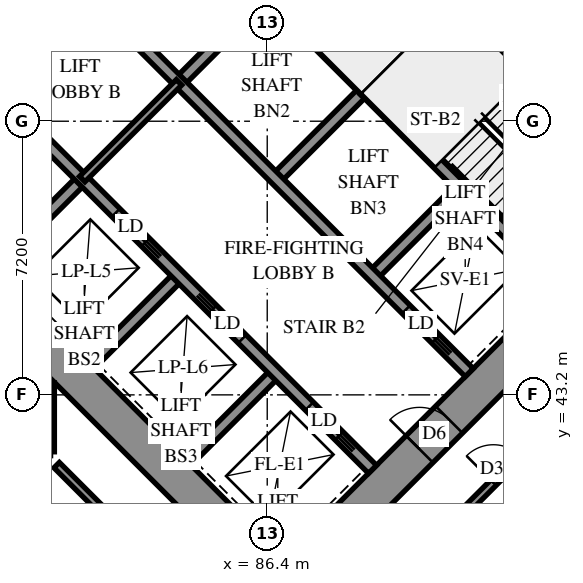
"""IFC4 building model, lengths in metres.
Left out: names, types, materials, properties, quantities, classifications, styles, units other than length and angle.
Written with IfcOpenShell. Run it as: python <this file> out.ifc"""

import sys

from ifc_helpers import new_model, si_unit, direction, frame, frame_2d, origin, place, context, subcontext, project, spatial, polyline, rectangle, outline, extrude, element, fill, save


model = new_model("IFC4")
c1 = context("Model", 3, precision=1e-05, world=origin(), true_north=direction((0.0, 1.0)))
c2 = subcontext(c1, "Body", "Model", "MODEL_VIEW")
j1 = project(units=[si_unit("LENGTHUNIT", "METRE"), si_unit("PLANEANGLEUNIT", "RADIAN")], contexts=[c1])
p1 = place(None, origin())
s1 = spatial("IfcSite", under=j1, at=p1, CompositionType="ELEMENT")
p2 = place(p1, origin())
s2 = spatial("IfcBuilding", under=s1, at=p2, CompositionType="ELEMENT")
p3 = place(p2, frame((0.0, 0.0, 18.6)))
s3 = spatial("IfcBuildingStorey", under=s2, at=p3, CompositionType="ELEMENT", Elevation=18.6)
p4 = place(p3, frame((75.594, 49.443, -0.4), z_axis=(0.0, 0.0, 1.0), x_axis=(0.7071037324, -0.70710983, 0.0)))
e1 = element("IfcWall", 1, at=p4, inside=s3, PredefinedType="SHEAR", context=c2, shape_type="SweptSolid", body=[
    extrude(rectangle(XDim=16.4, YDim=1.0, at=frame_2d((8.2, 0.0))), origin(), (0.0, 0.0, 1.0), 3.5),
])
p5 = place(p3, frame((86.483, 60.333, -0.4), z_axis=(0.0, 0.0, 1.0), x_axis=(0.70710983, -0.7071037324, 0.0)))
e2 = element("IfcWall", 2, at=p5, inside=s3, PredefinedType="SHEAR", context=c2, shape_type="SweptSolid", body=[
    extrude(rectangle(XDim=16.4, YDim=1.0, at=frame_2d((8.2, 0.0))), origin(), (0.0, 0.0, 1.0), 3.5),
])
p6 = place(p5, frame((11.0, 0.0, 0.4)))
e3 = element("IfcOpeningElement", 3, at=p6, cuts=e2, PredefinedType="OPENING", context=c2, shape_type="SweptSolid", body=[
    extrude(rectangle(XDim=0.8, YDim=2.1, at=frame_2d((0.4, 1.05))), frame((0.0, 0.51, 0.0), z_axis=(0.0, -1.0, 0.0), x_axis=(1.0, 0.0, 0.0)), (0.0, 0.0, 1.0), 1.02),
])
p7 = place(p3, frame((76.301, 49.443, -0.4), z_axis=(0.0, 0.0, 1.0), x_axis=(0.7071067812, 0.7071067812, 0.0)))
e4 = element("IfcWall", 4, at=p7, inside=s3, PredefinedType="SHEAR", context=c2, shape_type="SweptSolid", body=[
    extrude(rectangle(XDim=14.4, YDim=1.0, at=frame_2d((7.2, 0.0))), origin(), (0.0, 0.0, 1.0), 3.5),
])
p8 = place(p7, frame((4.55, 0.0, 0.4)))
e5 = element("IfcOpeningElement", 5, at=p8, cuts=e4, PredefinedType="OPENING", context=c2, shape_type="SweptSolid", body=[
    extrude(rectangle(XDim=1.1, YDim=2.1, at=frame_2d((0.55, 1.05))), frame((0.0, 0.51, 0.0), z_axis=(0.0, -1.0, 0.0), x_axis=(1.0, 0.0, 0.0)), (0.0, 0.0, 1.0), 1.02),
])
p9 = place(p7, frame((11.35, 0.0, 0.4)))
e6 = element("IfcOpeningElement", 6, at=p9, cuts=e4, PredefinedType="OPENING", context=c2, shape_type="SweptSolid", body=[
    extrude(rectangle(XDim=1.1, YDim=2.1, at=frame_2d((0.55, 1.05))), frame((0.0, 0.51, 0.0), z_axis=(0.0, -1.0, 0.0), x_axis=(1.0, 0.0, 0.0)), (0.0, 0.0, 1.0), 1.02),
])
p10 = place(p3, frame((87.19, 38.554, -0.4), z_axis=(0.0, 0.0, 1.0), x_axis=(0.707103309, 0.7071102534, 0.0)))
e7 = element("IfcWall", 7, at=p10, inside=s3, PredefinedType="SHEAR", context=c2, shape_type="SweptSolid", body=[
    extrude(rectangle(XDim=14.4, YDim=1.0, at=frame_2d((7.2, 0.0))), origin(), (0.0, 0.0, 1.0), 3.5),
])
p11 = place(p10, frame((4.55, 0.0, 0.4)))
e8 = element("IfcOpeningElement", 8, at=p11, cuts=e7, PredefinedType="OPENING", context=c2, shape_type="SweptSolid", body=[
    extrude(rectangle(XDim=1.1, YDim=2.1, at=frame_2d((0.55, 1.05))), frame((0.0, 0.51, 0.0), z_axis=(0.0, -1.0, 0.0), x_axis=(1.0, 0.0, 0.0)), (0.0, 0.0, 1.0), 1.02),
])
p12 = place(p10, frame((11.35, 0.0, 0.4)))
e9 = element("IfcOpeningElement", 9, at=p12, cuts=e7, PredefinedType="OPENING", context=c2, shape_type="SweptSolid", body=[
    extrude(rectangle(XDim=1.1, YDim=2.1, at=frame_2d((0.55, 1.05))), frame((0.0, 0.51, 0.0), z_axis=(0.0, -1.0, 0.0), x_axis=(1.0, 0.0, 0.0)), (0.0, 0.0, 1.0), 1.02),
])
for number, where, z_axis, x_axis in (
    (10, (79.2, 46.544, 0.0), (0.0, 0.0, 1.0), (0.707, 0.707, 0.0)),
    (11, (84.079, 51.423, 0.0), (0.0, 0.0, 1.0), (0.707, 0.707, 0.0)),
):
    element("IfcWall", number, at=place(p3, frame(where, z_axis=z_axis, x_axis=x_axis)), inside=s3, PredefinedType="SOLIDWALL", context=c2, shape_type="SweptSolid", body=[
        extrude(rectangle(XDim=3.3, YDim=0.3, at=frame_2d((1.65, 0.0))), origin(), (0.0, 0.0, 1.0), 3.8),
    ])
p13 = place(p3, frame((81.746, 43.999, 0.0), z_axis=(0.0, 0.0, 1.0), x_axis=(0.7071067812, 0.7071067812, 0.0)))
e12 = element("IfcWall", 12, at=p13, inside=s3, PredefinedType="SOLIDWALL", context=c2, shape_type="SweptSolid", body=[
    extrude(rectangle(XDim=3.3, YDim=0.3, at=frame_2d((1.65, 0.0))), origin(), (0.0, 0.0, 1.0), 3.8),
])
p14 = place(p3, frame((86.625, 48.878, 0.0), z_axis=(0.0, 0.0, 1.0), x_axis=(0.7071067812, 0.7071067812, 0.0)))
e13 = element("IfcWall", 13, at=p14, inside=s3, PredefinedType="SOLIDWALL", context=c2, shape_type="SweptSolid", body=[
    extrude(rectangle(XDim=3.3, YDim=0.3, at=frame_2d((1.65, 0.0))), origin(), (0.0, 0.0, 1.0), 3.8),
])
p15 = place(p3, frame((84.291, 41.453, 0.0), z_axis=(0.0, 0.0, 1.0), x_axis=(0.7071067812, 0.7071067812, 0.0)))
e14 = element("IfcWall", 14, at=p15, inside=s3, PredefinedType="SOLIDWALL", context=c2, shape_type="SweptSolid", body=[
    extrude(rectangle(XDim=3.3, YDim=0.3, at=frame_2d((1.65, 0.0))), origin(), (0.0, 0.0, 1.0), 3.8),
])
p16 = place(p3, frame((89.17, 46.332, 0.0), z_axis=(0.0, 0.0, 1.0), x_axis=(0.7071067812, 0.7071067812, 0.0)))
e15 = element("IfcWall", 15, at=p16, inside=s3, PredefinedType="SOLIDWALL", context=c2, shape_type="SweptSolid", body=[
    extrude(rectangle(XDim=3.3, YDim=0.3, at=frame_2d((1.65, 0.0))), origin(), (0.0, 0.0, 1.0), 3.8),
])
p17 = place(p3, frame((78.988, 51.423, 0.0), z_axis=(0.0, 0.0, 1.0), x_axis=(0.7071067812, -0.7071067812, 0.0)))
e16 = element("IfcWall", 16, at=p17, inside=s3, PredefinedType="SOLIDWALL", context=c2, shape_type="SweptSolid", body=[
    extrude(rectangle(XDim=14.4, YDim=0.3, at=frame_2d((7.2, 0.0))), origin(), (0.0, 0.0, 1.0), 3.8),
])
p18 = place(p17, frame((1.25, 0.0, 0.0)))
e17 = element("IfcOpeningElement", 17, at=p18, cuts=e16, PredefinedType="OPENING", context=c2, shape_type="SweptSolid", body=[
    extrude(rectangle(XDim=1.1, YDim=2.1, at=frame_2d((0.55, 1.05))), frame((0.0, 0.16, 0.0), z_axis=(0.0, -1.0, 0.0), x_axis=(1.0, 0.0, 0.0)), (0.0, 0.0, 1.0), 0.32),
])
p19 = place(p17, frame((4.85, 0.0, 0.0)))
e18 = element("IfcOpeningElement", 18, at=p19, cuts=e16, PredefinedType="OPENING", context=c2, shape_type="SweptSolid", body=[
    extrude(rectangle(XDim=1.1, YDim=2.1, at=frame_2d((0.55, 1.05))), frame((0.0, 0.16, 0.0), z_axis=(0.0, -1.0, 0.0), x_axis=(1.0, 0.0, 0.0)), (0.0, 0.0, 1.0), 0.32),
])
p20 = place(p17, frame((8.45, 0.0, 0.0)))
e19 = element("IfcOpeningElement", 19, at=p20, cuts=e16, PredefinedType="OPENING", context=c2, shape_type="SweptSolid", body=[
    extrude(rectangle(XDim=1.1, YDim=2.1, at=frame_2d((0.55, 1.05))), frame((0.0, 0.16, 0.0), z_axis=(0.0, -1.0, 0.0), x_axis=(1.0, 0.0, 0.0)), (0.0, 0.0, 1.0), 0.32),
])
p21 = place(p17, frame((12.05, 0.0, 0.0)))
e20 = element("IfcOpeningElement", 20, at=p21, cuts=e16, PredefinedType="OPENING", context=c2, shape_type="SweptSolid", body=[
    extrude(rectangle(XDim=1.1, YDim=2.1, at=frame_2d((0.55, 1.05))), frame((0.0, 0.16, 0.0), z_axis=(0.0, -1.0, 0.0), x_axis=(1.0, 0.0, 0.0)), (0.0, 0.0, 1.0), 0.32),
])
p22 = place(p3, frame((81.534, 53.969, 0.0), z_axis=(0.0, 0.0, 1.0), x_axis=(0.707103309, -0.7071102534, 0.0)))
e21 = element("IfcWall", 21, at=p22, inside=s3, PredefinedType="SOLIDWALL", context=c2, shape_type="SweptSolid", body=[
    extrude(rectangle(XDim=14.4, YDim=0.3, at=frame_2d((7.2, 0.0))), origin(), (0.0, 0.0, 1.0), 3.8),
])
p23 = place(p22, frame((12.05, 0.0, 0.0)))
e22 = element("IfcOpeningElement", 22, at=p23, cuts=e21, PredefinedType="OPENING", context=c2, shape_type="SweptSolid", body=[
    extrude(rectangle(XDim=1.1, YDim=2.1, at=frame_2d((0.55, 1.05))), frame((0.0, 0.16, 0.0), z_axis=(0.0, -1.0, 0.0), x_axis=(1.0, 0.0, 0.0)), (0.0, 0.0, 1.0), 0.32),
])
for number, where, z_axis, x_axis in (
    (23, (83.867, 56.302, 0.0), (0.0, 0.0, 1.0), (0.707, -0.707, 0.0)),
    (24, (88.958, 51.211, 0.0), (0.0, 0.0, 1.0), (0.707, -0.707, 0.0)),
):
    element("IfcWall", number, at=place(p3, frame(where, z_axis=z_axis, x_axis=x_axis)), inside=s3, PredefinedType="SOLIDWALL", context=c2, shape_type="SweptSolid", body=[
        extrude(rectangle(XDim=7.2, YDim=0.3, at=frame_2d((3.6, 0.0))), origin(), (0.0, 0.0, 1.0), 3.8),
    ])
p24 = place(p3, frame((88.958, 51.211, 0.0), z_axis=(0.0, 0.0, 1.0), x_axis=(0.7071067812, 0.7071067812, 0.0)))
e25 = element("IfcWall", 25, at=p24, inside=s3, PredefinedType="SOLIDWALL", context=c2, shape_type="SweptSolid", body=[
    extrude(rectangle(XDim=4.2, YDim=0.3, at=frame_2d((2.1, 0.0))), origin(), (0.0, 0.0, 1.0), 3.8),
])
p25 = place(p3, frame((117.843, 34.665, 0.0), z_axis=(0.0, 0.0, 1.0), x_axis=(-0.7071067812, 0.7071067812, 0.0)))
e26 = element("IfcWall", 26, at=p25, inside=s3, PredefinedType="SOLIDWALL", context=c2, shape_type="SweptSolid", body=[
    extrude(outline(polyline([(-0.275, -0.275), (54.222, -0.275), (53.994, 0.275), (0.275, 0.275), (-0.275, -0.275)])), origin(), (0.0, 0.0, 1.0), 3.8),
])
p26 = place(p25, frame((0.8, 0.0, 0.7)))
e27 = element("IfcOpeningElement", 27, at=p26, cuts=e26, PredefinedType="OPENING", context=c2, shape_type="SweptSolid", body=[
    extrude(rectangle(XDim=1.8, YDim=2.4, at=frame_2d((0.9, 1.2))), frame((0.0, 0.285, 0.0), z_axis=(0.0, -1.0, 0.0), x_axis=(1.0, 0.0, 0.0)), (0.0, 0.0, 1.0), 0.57),
])
p27 = place(p25, frame((4.225, 0.0, 0.7)))
e28 = element("IfcOpeningElement", 28, at=p27, cuts=e26, PredefinedType="OPENING", context=c2, shape_type="SweptSolid", body=[
    extrude(rectangle(XDim=1.8, YDim=2.4, at=frame_2d((0.9, 1.2))), frame((0.0, 0.285, 0.0), z_axis=(0.0, -1.0, 0.0), x_axis=(1.0, 0.0, 0.0)), (0.0, 0.0, 1.0), 0.57),
])
p28 = place(p25, frame((7.825, 0.0, 0.7)))
e29 = element("IfcOpeningElement", 29, at=p28, cuts=e26, PredefinedType="OPENING", context=c2, shape_type="SweptSolid", body=[
    extrude(rectangle(XDim=1.8, YDim=2.4, at=frame_2d((0.9, 1.2))), frame((0.0, 0.285, 0.0), z_axis=(0.0, -1.0, 0.0), x_axis=(1.0, 0.0, 0.0)), (0.0, 0.0, 1.0), 0.57),
])
p29 = place(p25, frame((11.425, 0.0, 0.7)))
e30 = element("IfcOpeningElement", 30, at=p29, cuts=e26, PredefinedType="OPENING", context=c2, shape_type="SweptSolid", body=[
    extrude(rectangle(XDim=1.8, YDim=2.4, at=frame_2d((0.9, 1.2))), frame((0.0, 0.285, 0.0), z_axis=(0.0, -1.0, 0.0), x_axis=(1.0, 0.0, 0.0)), (0.0, 0.0, 1.0), 0.57),
])
p30 = place(p25, frame((15.025, 0.0, 0.7)))
e31 = element("IfcOpeningElement", 31, at=p30, cuts=e26, PredefinedType="OPENING", context=c2, shape_type="SweptSolid", body=[
    extrude(rectangle(XDim=1.8, YDim=2.4, at=frame_2d((0.9, 1.2))), frame((0.0, 0.285, 0.0), z_axis=(0.0, -1.0, 0.0), x_axis=(1.0, 0.0, 0.0)), (0.0, 0.0, 1.0), 0.57),
])
p31 = place(p25, frame((18.625, 0.0, 0.7)))
e32 = element("IfcOpeningElement", 32, at=p31, cuts=e26, PredefinedType="OPENING", context=c2, shape_type="SweptSolid", body=[
    extrude(rectangle(XDim=1.8, YDim=2.4, at=frame_2d((0.9, 1.2))), frame((0.0, 0.285, 0.0), z_axis=(0.0, -1.0, 0.0), x_axis=(1.0, 0.0, 0.0)), (0.0, 0.0, 1.0), 0.57),
])
p32 = place(p25, frame((22.225, 0.0, 0.7)))
e33 = element("IfcOpeningElement", 33, at=p32, cuts=e26, PredefinedType="OPENING", context=c2, shape_type="SweptSolid", body=[
    extrude(rectangle(XDim=1.8, YDim=2.4, at=frame_2d((0.9, 1.2))), frame((0.0, 0.285, 0.0), z_axis=(0.0, -1.0, 0.0), x_axis=(1.0, 0.0, 0.0)), (0.0, 0.0, 1.0), 0.57),
])
p33 = place(p25, frame((25.825, 0.0, 0.7)))
e34 = element("IfcOpeningElement", 34, at=p33, cuts=e26, PredefinedType="OPENING", context=c2, shape_type="SweptSolid", body=[
    extrude(rectangle(XDim=1.8, YDim=2.4, at=frame_2d((0.9, 1.2))), frame((0.0, 0.285, 0.0), z_axis=(0.0, -1.0, 0.0), x_axis=(1.0, 0.0, 0.0)), (0.0, 0.0, 1.0), 0.57),
])
p34 = place(p25, frame((29.425, 0.0, 0.7)))
e35 = element("IfcOpeningElement", 35, at=p34, cuts=e26, PredefinedType="OPENING", context=c2, shape_type="SweptSolid", body=[
    extrude(rectangle(XDim=1.8, YDim=2.4, at=frame_2d((0.9, 1.2))), frame((0.0, 0.285, 0.0), z_axis=(0.0, -1.0, 0.0), x_axis=(1.0, 0.0, 0.0)), (0.0, 0.0, 1.0), 0.57),
])
p35 = place(p25, frame((33.025, 0.0, 0.7)))
e36 = element("IfcOpeningElement", 36, at=p35, cuts=e26, PredefinedType="OPENING", context=c2, shape_type="SweptSolid", body=[
    extrude(rectangle(XDim=1.8, YDim=2.4, at=frame_2d((0.9, 1.2))), frame((0.0, 0.285, 0.0), z_axis=(0.0, -1.0, 0.0), x_axis=(1.0, 0.0, 0.0)), (0.0, 0.0, 1.0), 0.57),
])
p36 = place(p25, frame((36.625, 0.0, 0.7)))
e37 = element("IfcOpeningElement", 37, at=p36, cuts=e26, PredefinedType="OPENING", context=c2, shape_type="SweptSolid", body=[
    extrude(rectangle(XDim=1.8, YDim=2.4, at=frame_2d((0.9, 1.2))), frame((0.0, 0.285, 0.0), z_axis=(0.0, -1.0, 0.0), x_axis=(1.0, 0.0, 0.0)), (0.0, 0.0, 1.0), 0.57),
])
p37 = place(p25, frame((40.225, 0.0, 0.7)))
e38 = element("IfcOpeningElement", 38, at=p37, cuts=e26, PredefinedType="OPENING", context=c2, shape_type="SweptSolid", body=[
    extrude(rectangle(XDim=1.8, YDim=2.4, at=frame_2d((0.9, 1.2))), frame((0.0, 0.285, 0.0), z_axis=(0.0, -1.0, 0.0), x_axis=(1.0, 0.0, 0.0)), (0.0, 0.0, 1.0), 0.57),
])
p38 = place(p25, frame((43.825, 0.0, 0.7)))
e39 = element("IfcOpeningElement", 39, at=p38, cuts=e26, PredefinedType="OPENING", context=c2, shape_type="SweptSolid", body=[
    extrude(rectangle(XDim=1.8, YDim=2.4, at=frame_2d((0.9, 1.2))), frame((0.0, 0.285, 0.0), z_axis=(0.0, -1.0, 0.0), x_axis=(1.0, 0.0, 0.0)), (0.0, 0.0, 1.0), 0.57),
])
p39 = place(p25, frame((47.425, 0.0, 0.7)))
e40 = element("IfcOpeningElement", 40, at=p39, cuts=e26, PredefinedType="OPENING", context=c2, shape_type="SweptSolid", body=[
    extrude(rectangle(XDim=1.8, YDim=2.4, at=frame_2d((0.9, 1.2))), frame((0.0, 0.285, 0.0), z_axis=(0.0, -1.0, 0.0), x_axis=(1.0, 0.0, 0.0)), (0.0, 0.0, 1.0), 0.57),
])
p40 = place(p25, frame((51.06, 0.0, 0.7)))
e41 = element("IfcOpeningElement", 41, at=p40, cuts=e26, PredefinedType="OPENING", context=c2, shape_type="SweptSolid", body=[
    extrude(rectangle(XDim=1.8, YDim=2.4, at=frame_2d((0.9, 1.2))), frame((0.0, 0.285, 0.0), z_axis=(0.0, -1.0, 0.0), x_axis=(1.0, 0.0, 0.0)), (0.0, 0.0, 1.0), 0.57),
])
p41 = place(p3, frame((77.07, 42.275, 0.0), z_axis=(0.0, 0.0, 1.0), x_axis=(0.7071067812, -0.7071067812, 0.0)))
e42 = element("IfcWall", 42, at=p41, inside=s3, PredefinedType="SOLIDWALL", context=c2, shape_type="SweptSolid", body=[
    extrude(outline(polyline([(0.114, -0.275), (39.288, -0.275), (38.737, 0.275), (-0.114, 0.275), (0.114, -0.275)])), origin(), (0.0, 0.0, 1.0), 3.8),
])
p42 = place(p41, frame((2.837, 0.0, 0.7)))
e43 = element("IfcOpeningElement", 43, at=p42, cuts=e42, PredefinedType="OPENING", context=c2, shape_type="SweptSolid", body=[
    extrude(rectangle(XDim=1.8, YDim=2.4, at=frame_2d((0.9, 1.2))), frame((0.0, 0.285, 0.0), z_axis=(0.0, -1.0, 0.0), x_axis=(1.0, 0.0, 0.0)), (0.0, 0.0, 1.0), 0.57),
])
p43 = place(p41, frame((6.588, 0.0, 0.7)))
e44 = element("IfcOpeningElement", 44, at=p43, cuts=e42, PredefinedType="OPENING", context=c2, shape_type="SweptSolid", body=[
    extrude(rectangle(XDim=1.8, YDim=2.4, at=frame_2d((0.9, 1.2))), frame((0.0, 0.285, 0.0), z_axis=(0.0, -1.0, 0.0), x_axis=(1.0, 0.0, 0.0)), (0.0, 0.0, 1.0), 0.57),
])
p44 = place(p41, frame((10.188, 0.0, 0.7)))
e45 = element("IfcOpeningElement", 45, at=p44, cuts=e42, PredefinedType="OPENING", context=c2, shape_type="SweptSolid", body=[
    extrude(rectangle(XDim=1.8, YDim=2.4, at=frame_2d((0.9, 1.2))), frame((0.0, 0.285, 0.0), z_axis=(0.0, -1.0, 0.0), x_axis=(1.0, 0.0, 0.0)), (0.0, 0.0, 1.0), 0.57),
])
p45 = place(p41, frame((13.787, 0.0, 0.7)))
e46 = element("IfcOpeningElement", 46, at=p45, cuts=e42, PredefinedType="OPENING", context=c2, shape_type="SweptSolid", body=[
    extrude(rectangle(XDim=1.8, YDim=2.4, at=frame_2d((0.9, 1.2))), frame((0.0, 0.285, 0.0), z_axis=(0.0, -1.0, 0.0), x_axis=(1.0, 0.0, 0.0)), (0.0, 0.0, 1.0), 0.57),
])
p46 = place(p41, frame((17.387, 0.0, 0.7)))
e47 = element("IfcOpeningElement", 47, at=p46, cuts=e42, PredefinedType="OPENING", context=c2, shape_type="SweptSolid", body=[
    extrude(rectangle(XDim=1.8, YDim=2.4, at=frame_2d((0.9, 1.2))), frame((0.0, 0.285, 0.0), z_axis=(0.0, -1.0, 0.0), x_axis=(1.0, 0.0, 0.0)), (0.0, 0.0, 1.0), 0.57),
])
p47 = place(p41, frame((20.988, 0.0, 0.7)))
e48 = element("IfcOpeningElement", 48, at=p47, cuts=e42, PredefinedType="OPENING", context=c2, shape_type="SweptSolid", body=[
    extrude(rectangle(XDim=1.8, YDim=2.4, at=frame_2d((0.9, 1.2))), frame((0.0, 0.285, 0.0), z_axis=(0.0, -1.0, 0.0), x_axis=(1.0, 0.0, 0.0)), (0.0, 0.0, 1.0), 0.57),
])
p48 = place(p41, frame((24.587, 0.0, 0.7)))
e49 = element("IfcOpeningElement", 49, at=p48, cuts=e42, PredefinedType="OPENING", context=c2, shape_type="SweptSolid", body=[
    extrude(rectangle(XDim=1.8, YDim=2.4, at=frame_2d((0.9, 1.2))), frame((0.0, 0.285, 0.0), z_axis=(0.0, -1.0, 0.0), x_axis=(1.0, 0.0, 0.0)), (0.0, 0.0, 1.0), 0.57),
])
p49 = place(p41, frame((28.188, 0.0, 0.7)))
e50 = element("IfcOpeningElement", 50, at=p49, cuts=e42, PredefinedType="OPENING", context=c2, shape_type="SweptSolid", body=[
    extrude(rectangle(XDim=1.8, YDim=2.4, at=frame_2d((0.9, 1.2))), frame((0.0, 0.285, 0.0), z_axis=(0.0, -1.0, 0.0), x_axis=(1.0, 0.0, 0.0)), (0.0, 0.0, 1.0), 0.57),
])
p50 = place(p41, frame((31.788, 0.0, 0.7)))
e51 = element("IfcOpeningElement", 51, at=p50, cuts=e42, PredefinedType="OPENING", context=c2, shape_type="SweptSolid", body=[
    extrude(rectangle(XDim=1.8, YDim=2.4, at=frame_2d((0.9, 1.2))), frame((0.0, 0.285, 0.0), z_axis=(0.0, -1.0, 0.0), x_axis=(1.0, 0.0, 0.0)), (0.0, 0.0, 1.0), 0.57),
])
p51 = place(p41, frame((35.388, 0.0, 0.7)))
e52 = element("IfcOpeningElement", 52, at=p51, cuts=e42, PredefinedType="OPENING", context=c2, shape_type="SweptSolid", body=[
    extrude(rectangle(XDim=1.8, YDim=2.4, at=frame_2d((0.9, 1.2))), frame((0.0, 0.285, 0.0), z_axis=(0.0, -1.0, 0.0), x_axis=(1.0, 0.0, 0.0)), (0.0, 0.0, 1.0), 0.57),
])
p52 = place(p3, frame((91.313, 53.354, 0.0), z_axis=(0.0, 0.0, 1.0), x_axis=(0.7071140275, -0.7070995348, 0.0)))
e53 = element("IfcWall", 53, at=p52, inside=s3, PredefinedType="PARTITIONING", context=c2, shape_type="SweptSolid", body=[
    extrude(rectangle(XDim=6.9, YDim=0.15, at=frame_2d((3.45, 0.0))), origin(), (0.0, 0.0, 1.0), 3.8),
])
p53 = place(p3, frame((81.534, 48.878, 0.0), z_axis=(0.0, 0.0, 1.0), x_axis=(0.707092892, 0.7071206701, 0.0)))
e54 = element("IfcWall", 54, at=p53, inside=s3, PredefinedType="PARTITIONING", context=c2, shape_type="SweptSolid", body=[
    extrude(rectangle(XDim=3.6, YDim=0.2, at=frame_2d((1.8, 0.0))), origin(), (0.0, 0.0, 1.0), 3.8),
])
p54 = place(p3, frame((86.376, 33.357, 0.0), z_axis=(0.0, 0.0, 1.0), x_axis=(0.7071021083, 0.707111454, 0.0)))
e55 = element("IfcWall", 55, at=p54, inside=s3, PredefinedType="PARTITIONING", context=c2, shape_type="SweptSolid", body=[
    extrude(rectangle(XDim=10.7, YDim=0.2, at=frame_2d((5.35, 0.0))), origin(), (0.0, 0.0, 1.0), 3.8),
])
p55 = place(p3, frame((86.836, 35.372, 0.0), z_axis=(0.0, 0.0, 1.0), x_axis=(0.7071067812, 0.7071067812, 0.0)))
e56 = element("IfcWall", 56, at=p55, inside=s3, PredefinedType="PARTITIONING", context=c2, shape_type="SweptSolid", body=[
    extrude(rectangle(XDim=8.949, YDim=0.2, at=frame_2d((4.474, 0.0))), origin(), (0.0, 0.0, 1.0), 3.8),
])
p56 = place(p55, frame((7.8, 0.0, 0.0)))
e57 = element("IfcOpeningElement", 57, at=p56, cuts=e56, PredefinedType="OPENING", context=c2, shape_type="SweptSolid", body=[
    extrude(rectangle(XDim=1.0, YDim=2.1, at=frame_2d((0.5, 1.05))), frame((0.0, 0.11, 0.0), z_axis=(0.0, -1.0, 0.0), x_axis=(1.0, 0.0, 0.0)), (0.0, 0.0, 1.0), 0.22),
])
p57 = place(p3, frame((85.07, 37.142, 0.0), z_axis=(0.0, 0.0, 1.0), x_axis=(-0.7070899851, 0.7071235769, 0.0)))
e58 = element("IfcWall", 58, at=p57, inside=s3, PredefinedType="PARTITIONING", context=c2, shape_type="SweptSolid", body=[
    extrude(rectangle(XDim=5.954, YDim=0.2, at=frame_2d((2.977, 0.0))), origin(), (0.0, 0.0, 1.0), 3.8),
])
p58 = place(p57, frame((2.326, 0.0, 0.0)))
e59 = element("IfcOpeningElement", 59, at=p58, cuts=e58, PredefinedType="OPENING", context=c2, shape_type="SweptSolid", body=[
    extrude(rectangle(XDim=1.0, YDim=2.1, at=frame_2d((0.5, 1.05))), frame((0.0, 0.11, 0.0), z_axis=(0.0, -1.0, 0.0), x_axis=(1.0, 0.0, 0.0)), (0.0, 0.0, 1.0), 0.22),
])
p59 = place(p3, frame((80.7, 41.702, 0.0), z_axis=(0.0, 0.0, 1.0), x_axis=(0.0, 1.0, 0.0)))
e60 = element("IfcWall", 60, at=p59, inside=s3, PredefinedType="PARTITIONING", context=c2, shape_type="SweptSolid", body=[
    extrude(rectangle(XDim=1.814, YDim=0.2, at=frame_2d((0.907, 0.0))), origin(), (0.0, 0.0, 1.0), 3.8),
])
p60 = place(p11, origin())
e61 = element("IfcDoor", 61, at=p60, inside=s3, OperationType="DOUBLE_DOOR_SINGLE_SWING", PredefinedType="DOOR", context=c2, shape_type="SweptSolid", body=[
    extrude(rectangle(XDim=1.1, YDim=2.1, at=frame_2d((0.55, 1.05))), frame((0.0, 0.025, 0.0), z_axis=(0.0, -1.0, 0.0), x_axis=(1.0, 0.0, 0.0)), (0.0, 0.0, 1.0), 0.05),
])
fill(e8, e61)
p61 = place(p19, origin())
e62 = element("IfcDoor", 62, at=p61, inside=s3, OperationType="SLIDING_TO_RIGHT", PredefinedType="DOOR", context=c2, shape_type="SweptSolid", body=[
    extrude(rectangle(XDim=1.1, YDim=2.1, at=frame_2d((0.55, 1.05))), frame((0.0, 0.025, 0.0), z_axis=(0.0, -1.0, 0.0), x_axis=(1.0, 0.0, 0.0)), (0.0, 0.0, 1.0), 0.05),
])
fill(e18, e62)
p62 = place(p20, origin())
e63 = element("IfcDoor", 63, at=p62, inside=s3, OperationType="SLIDING_TO_LEFT", PredefinedType="DOOR", context=c2, shape_type="SweptSolid", body=[
    extrude(rectangle(XDim=1.1, YDim=2.1, at=frame_2d((0.55, 1.05))), frame((0.0, 0.025, 0.0), z_axis=(0.0, -1.0, 0.0), x_axis=(1.0, 0.0, 0.0)), (0.0, 0.0, 1.0), 0.05),
])
fill(e19, e63)
p63 = place(p21, origin())
e64 = element("IfcDoor", 64, at=p63, inside=s3, OperationType="SLIDING_TO_RIGHT", PredefinedType="DOOR", context=c2, shape_type="SweptSolid", body=[
    extrude(rectangle(XDim=1.1, YDim=2.1, at=frame_2d((0.55, 1.05))), frame((0.0, 0.025, 0.0), z_axis=(0.0, -1.0, 0.0), x_axis=(1.0, 0.0, 0.0)), (0.0, 0.0, 1.0), 0.05),
])
fill(e20, e64)
p64 = place(p23, origin())
e65 = element("IfcDoor", 65, at=p64, inside=s3, OperationType="SLIDING_TO_RIGHT", PredefinedType="DOOR", context=c2, shape_type="SweptSolid", body=[
    extrude(rectangle(XDim=1.1, YDim=2.1, at=frame_2d((0.55, 1.05))), frame((0.0, 0.025, 0.0), z_axis=(0.0, -1.0, 0.0), x_axis=(1.0, 0.0, 0.0)), (0.0, 0.0, 1.0), 0.05),
])
fill(e22, e65)
p65 = place(p56, origin())
e66 = element("IfcDoor", 66, at=p65, inside=s3, OperationType="SINGLE_SWING_RIGHT", PredefinedType="DOOR", context=c2, shape_type="SweptSolid", body=[
    extrude(rectangle(XDim=1.0, YDim=2.1, at=frame_2d((0.5, 1.05))), frame((0.0, 0.025, 0.0), z_axis=(0.0, -1.0, 0.0), x_axis=(1.0, 0.0, 0.0)), (0.0, 0.0, 1.0), 0.05),
])
fill(e57, e66)
save(model, sys.argv[1])
